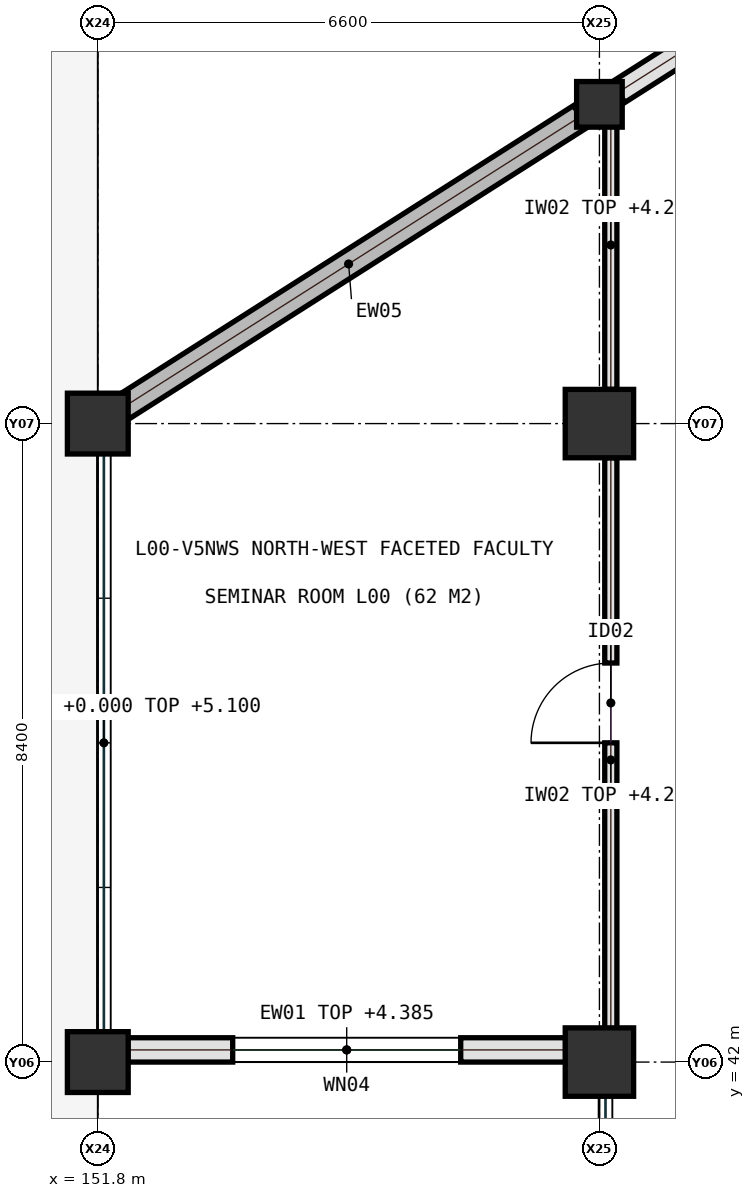
"""IFC4 building model, lengths in metres.
Left out: names, types, materials, properties, quantities, classifications, styles, units other than length and angle.
Written with IfcOpenShell. Run it as: python <this file> out.ifc"""

import sys

from ifc_helpers import new_model, si_unit, direction, frame, frame_2d, origin, origin_2d, place, context, subcontext, project, spatial, rectangle, extrude, element, fill, save


model = new_model("IFC4")
c1 = context("Model", 3, precision=1e-05, world=origin(), true_north=direction((0.0, 1.0)))
c2 = subcontext(c1, "Body", "Model", "MODEL_VIEW")
j1 = project(units=[si_unit("LENGTHUNIT", "METRE"), si_unit("PLANEANGLEUNIT", "RADIAN")], contexts=[c1])
p1 = place(None, origin())
s1 = spatial("IfcSite", under=j1, at=p1, CompositionType="ELEMENT")
p2 = place(p1, origin())
s2 = spatial("IfcBuilding", under=s1, at=p2, CompositionType="ELEMENT")
p3 = place(p2, origin())
s3 = spatial("IfcBuildingStorey", under=s2, at=p3, CompositionType="ELEMENT", Elevation=0.0)
for number, where, z_axis, x_axis in (
    (1, (151.8, 42.0, 0.0), (0.0, 0.0, 1.0), (1.0, 0.0, 0.0)),
    (2, (151.8, 50.4, 0.0), (0.0, 0.0, 1.0), (1.0, 0.0, 0.0)),
):
    element("IfcColumn", number, at=place(p3, frame(where, z_axis=z_axis, x_axis=x_axis)), inside=s3, PredefinedType="COLUMN", context=c2, shape_type="SweptSolid", body=[
        extrude(rectangle(XDim=0.8, YDim=0.8, at=origin_2d()), origin(), (0.0, 0.0, 1.0), 5.4),
    ])
for number, where, z_axis, x_axis in (
    (3, (158.4, 42.0, 0.0), (0.0, 0.0, 1.0), (1.0, 0.0, 0.0)),
    (4, (158.4, 50.4, 0.0), (0.0, 0.0, 1.0), (1.0, 0.0, 0.0)),
):
    element("IfcColumn", number, at=place(p3, frame(where, z_axis=z_axis, x_axis=x_axis)), inside=s3, PredefinedType="COLUMN", context=c2, shape_type="SweptSolid", body=[
        extrude(rectangle(XDim=0.9, YDim=0.9, at=origin_2d()), origin(), (0.0, 0.0, 1.0), 5.4),
    ])
p4 = place(p3, frame((158.4, 54.6, 0.0), z_axis=(0.0, 0.0, 1.0), x_axis=(1.0, 0.0, 0.0)))
e5 = element("IfcColumn", 5, at=p4, inside=s3, PredefinedType="COLUMN", context=c2, shape_type="SweptSolid", body=[
    extrude(rectangle(XDim=0.6, YDim=0.6, at=origin_2d()), origin(), (0.0, 0.0, 1.0), 5.4),
])
p5 = place(p3, frame((158.55, 42.0, 0.0), z_axis=(0.0, 0.0, 1.0), x_axis=(0.0, 1.0, 0.0)))
e6 = element("IfcWall", 6, at=p5, inside=s3, PredefinedType="PARTITIONING", context=c2, shape_type="SweptSolid", body=[
    extrude(rectangle(XDim=7.95, YDim=0.16, at=frame_2d((3.975, 0.0))), origin(), (0.0, 0.0, 1.0), 4.25),
])
p6 = place(p5, frame((4.2, 0.0, 0.0)))
e7 = element("IfcOpeningElement", 7, at=p6, cuts=e6, PredefinedType="OPENING", context=c2, shape_type="SweptSolid", body=[
    extrude(rectangle(XDim=1.05, YDim=2.15, at=frame_2d((0.525, 1.075))), frame((0.0, 0.09, 0.0), z_axis=(0.0, -1.0, 0.0), x_axis=(1.0, 0.0, 0.0)), (0.0, 0.0, 1.0), 0.18),
])
p7 = place(p3, frame((158.55, 50.85, 0.0), z_axis=(0.0, 0.0, 1.0), x_axis=(0.0, 1.0, 0.0)))
e8 = element("IfcWall", 8, at=p7, inside=s3, PredefinedType="PARTITIONING", context=c2, shape_type="SweptSolid", body=[
    extrude(rectangle(XDim=3.8, YDim=0.16, at=frame_2d((1.9, 0.0))), origin(), (0.0, 0.0, 1.0), 4.25),
])
p8 = place(p3, frame((152.195, 42.16, 0.0), z_axis=(0.0, 0.0, 1.0), x_axis=(1.0, 0.0, 0.0)))
e9 = element("IfcWall", 9, at=p8, inside=s3, PredefinedType="SOLIDWALL", context=c2, shape_type="SweptSolid", body=[
    extrude(rectangle(XDim=5.76, YDim=0.32, at=frame_2d((2.88, 0.0))), origin(), (0.0, 0.0, 1.0), 4.385),
])
p9 = place(p8, frame((1.38, 0.0, 0.95)))
e10 = element("IfcOpeningElement", 10, at=p9, cuts=e9, PredefinedType="OPENING", context=c2, shape_type="SweptSolid", body=[
    extrude(rectangle(XDim=3.0, YDim=1.8, at=frame_2d((1.5, 0.9))), frame((0.0, 0.17, 0.0), z_axis=(0.0, -1.0, 0.0), x_axis=(1.0, 0.0, 0.0)), (0.0, 0.0, 1.0), 0.34),
])
p10 = place(p3, frame((152.05, 50.56, 0.0), z_axis=(0.0, 0.0, 1.0), x_axis=(0.843776886751, 0.536694107835, 0.0)))
e11 = element("IfcWall", 11, at=p10, inside=s3, PredefinedType="SHEAR", context=c2, shape_type="SweptSolid", body=[
    extrude(rectangle(XDim=7.229, YDim=0.34, at=frame_2d((3.615, 0.0))), origin(), (0.0, 0.0, 1.0), 5.1),
])
p11 = place(p3, frame((158.65, 54.76, 0.0), z_axis=(0.0, 0.0, 1.0), x_axis=(0.843786613851, 0.536678814829, 0.0)))
e12 = element("IfcWall", 12, at=p11, inside=s3, PredefinedType="SOLIDWALL", context=c2, shape_type="SweptSolid", body=[
    extrude(rectangle(XDim=7.229, YDim=0.32, at=frame_2d((3.615, 0.0))), origin(), (0.0, 0.0, 1.0), 4.485),
])
p12 = place(p11, frame((2.415, 0.0, 0.95)))
e13 = element("IfcOpeningElement", 13, at=p12, cuts=e12, PredefinedType="OPENING", context=c2, shape_type="SweptSolid", body=[
    extrude(rectangle(XDim=2.4, YDim=1.6, at=frame_2d((1.2, 0.8))), frame((0.0, 0.17, 0.0), z_axis=(0.0, -1.0, 0.0), x_axis=(1.0, 0.0, 0.0)), (0.0, 0.0, 1.0), 0.34),
])
p13 = place(p6, origin())
e14 = element("IfcDoor", 14, at=p13, inside=s3, OperationType="SINGLE_SWING_LEFT", PredefinedType="DOOR", context=c2, shape_type="SweptSolid", body=[
    extrude(rectangle(XDim=1.05, YDim=2.15, at=frame_2d((0.525, 1.075))), frame((0.0, 0.025, 0.0), z_axis=(0.0, -1.0, 0.0), x_axis=(1.0, 0.0, 0.0)), (0.0, 0.0, 1.0), 0.05),
])
fill(e7, e14)
p14 = place(p9, origin())
e15 = element("IfcWindow", 15, at=p14, inside=s3, PartitioningType="SINGLE_PANEL", PredefinedType="WINDOW", context=c2, shape_type="SweptSolid", body=[
    extrude(rectangle(XDim=3.0, YDim=1.8, at=frame_2d((1.5, 0.9))), frame((0.0, 0.03, 0.0), z_axis=(0.0, -1.0, 0.0), x_axis=(1.0, 0.0, 0.0)), (0.0, 0.0, 1.0), 0.06),
])
fill(e10, e15)
save(model, sys.argv[1])
